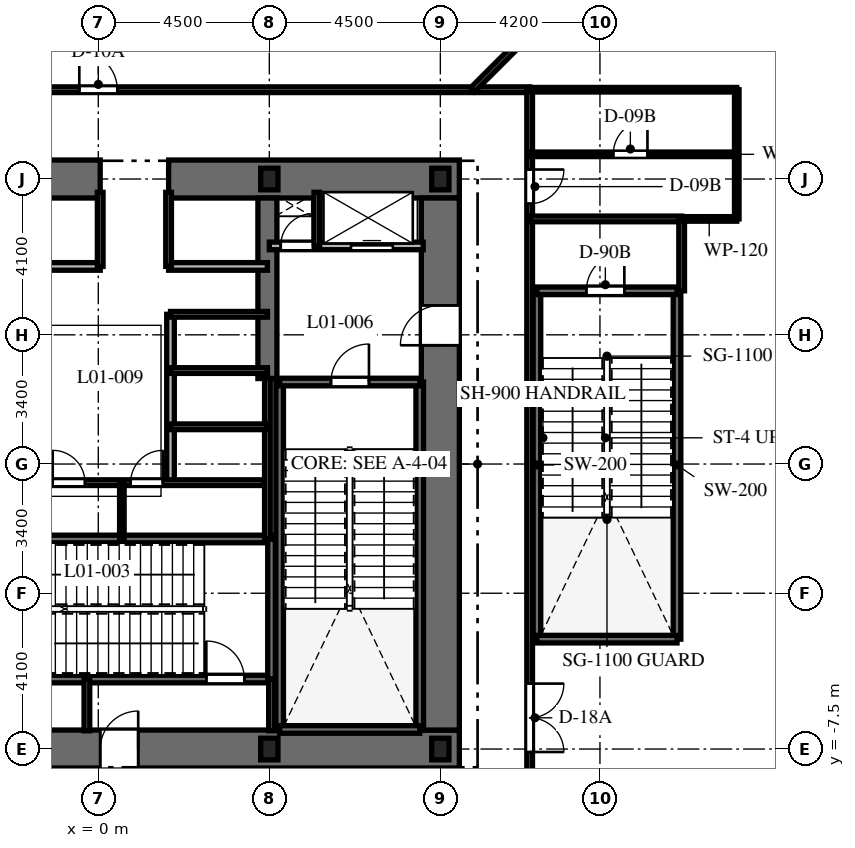
"""IFC4 building model, lengths in metres.
Left out: names, types, materials, properties, quantities, classifications, styles, units other than length and angle.
Written with IfcOpenShell. Run it as: python <this file> out.ifc"""

import sys

from ifc_helpers import new_model, si_unit, direction, frame, frame_2d, origin, origin_2d, place, context, subcontext, project, spatial, rectangle, i_section, extrude, element, fill, save


model = new_model("IFC4")
c1 = context("Model", 3, precision=1e-05, world=origin(), true_north=direction((0.0, 1.0)))
c2 = subcontext(c1, "Body", "Model", "MODEL_VIEW")
j1 = project(units=[si_unit("LENGTHUNIT", "METRE"), si_unit("PLANEANGLEUNIT", "RADIAN")], contexts=[c1])
p1 = place(None, origin())
s1 = spatial("IfcSite", under=j1, at=p1, CompositionType="ELEMENT")
p2 = place(p1, origin())
s2 = spatial("IfcBuilding", under=s1, at=p2, CompositionType="ELEMENT")
p3 = place(p2, frame((0.0, 0.0, 6.0)))
s3 = spatial("IfcBuildingStorey", under=s2, at=p3, CompositionType="ELEMENT", Elevation=6.0)
p4 = place(p3, frame((-9.5, -7.5, 0.0), z_axis=(0.0, 0.0, 1.0), x_axis=(1.0, 0.0, 0.0)))
e1 = element("IfcWall", 1, at=p4, inside=s3, PredefinedType="SHEAR", context=c2, shape_type="SweptSolid", body=[
    extrude(rectangle(XDim=19.0, YDim=1.0, at=frame_2d((9.5, 0.0))), origin(), (0.0, 0.0, 1.0), 5.4),
])
p5 = place(p4, frame((9.55, 0.0, 0.0)))
e2 = element("IfcOpeningElement", 2, at=p5, cuts=e1, PredefinedType="OPENING", context=c2, shape_type="SweptSolid", body=[
    extrude(rectangle(XDim=1.0, YDim=2.15, at=frame_2d((0.5, 1.075))), frame((0.0, 0.51, 0.0), z_axis=(0.0, -1.0, 0.0), x_axis=(1.0, 0.0, 0.0)), (0.0, 0.0, 1.0), 1.02),
])
p6 = place(p3, frame((-9.5, 7.5, 0.0), z_axis=(0.0, 0.0, 1.0), x_axis=(1.0, 0.0, 0.0)))
e3 = element("IfcWall", 3, at=p6, inside=s3, PredefinedType="SHEAR", context=c2, shape_type="SweptSolid", body=[
    extrude(rectangle(XDim=9.55, YDim=1.0, at=frame_2d((4.775, 0.0))), origin(), (0.0, 0.0, 1.0), 5.4),
])
p7 = place(p3, frame((1.85, 7.5, 0.0), z_axis=(0.0, 0.0, 1.0), x_axis=(1.0, 0.0, 0.0)))
e4 = element("IfcWall", 4, at=p7, inside=s3, PredefinedType="SHEAR", context=c2, shape_type="SweptSolid", body=[
    extrude(rectangle(XDim=7.65, YDim=1.0, at=frame_2d((3.825, 0.0))), origin(), (0.0, 0.0, 1.0), 5.4),
])
p8 = place(p3, frame((9.0, -7.0, 0.0), z_axis=(0.0, 0.0, 1.0), x_axis=(0.0, 1.0, 0.0)))
e5 = element("IfcWall", 5, at=p8, inside=s3, PredefinedType="SHEAR", context=c2, shape_type="SweptSolid", body=[
    extrude(rectangle(XDim=14.0, YDim=1.0, at=frame_2d((7.0, 0.0))), origin(), (0.0, 0.0, 1.0), 5.4),
])
p9 = place(p8, frame((10.125, 0.0, 0.0)))
e6 = element("IfcOpeningElement", 6, at=p9, cuts=e5, PredefinedType="OPENING", context=c2, shape_type="SweptSolid", body=[
    extrude(rectangle(XDim=1.05, YDim=2.15, at=frame_2d((0.525, 1.075))), frame((0.0, 0.51, 0.0), z_axis=(0.0, -1.0, 0.0), x_axis=(1.0, 0.0, 0.0)), (0.0, 0.0, 1.0), 1.02),
])
p10 = place(p3, frame((4.45, 2.25, 0.0), z_axis=(0.0, 0.0, 1.0), x_axis=(0.0, 1.0, 0.0)))
e7 = element("IfcWall", 7, at=p10, inside=s3, PredefinedType="SHEAR", context=c2, shape_type="SweptSolid", body=[
    extrude(rectangle(XDim=4.75, YDim=0.5, at=frame_2d((2.375, 0.0))), origin(), (0.0, 0.0, 1.0), 5.4),
])
for number, where, z_axis, x_axis in (
    (8, (4.772, -6.985, 0.0), (0.0, 0.0, 1.0), (0.0, 1.0, 0.0)),
    (9, (8.458, -6.985, 0.0), (0.0, 0.0, 1.0), (0.0, 1.0, 0.0)),
):
    element("IfcWall", number, at=place(p3, frame(where, z_axis=z_axis, x_axis=x_axis)), inside=s3, PredefinedType="SHEAR", context=c2, shape_type="SweptSolid", body=[
        extrude(rectangle(XDim=9.143, YDim=0.2, at=frame_2d((4.572, 0.0))), origin(), (0.0, 0.0, 1.0), 5.4),
    ])
p11 = place(p3, frame((4.772, -6.985, 0.0), z_axis=(0.0, 0.0, 1.0), x_axis=(1.0, 0.0, 0.0)))
e10 = element("IfcWall", 10, at=p11, inside=s3, PredefinedType="SHEAR", context=c2, shape_type="SweptSolid", body=[
    extrude(rectangle(XDim=3.686, YDim=0.2, at=frame_2d((1.843, 0.0))), origin(), (0.0, 0.0, 1.0), 5.4),
])
p12 = place(p3, frame((4.772, 2.158, 0.0), z_axis=(0.0, 0.0, 1.0), x_axis=(1.0, 0.0, 0.0)))
e11 = element("IfcWall", 11, at=p12, inside=s3, PredefinedType="SHEAR", context=c2, shape_type="SweptSolid", body=[
    extrude(rectangle(XDim=3.686, YDim=0.2, at=frame_2d((1.843, 0.0))), origin(), (0.0, 0.0, 1.0), 5.4),
])
p13 = place(p12, frame((1.35, 0.0, 0.0)))
e12 = element("IfcOpeningElement", 12, at=p13, cuts=e11, PredefinedType="OPENING", context=c2, shape_type="SweptSolid", body=[
    extrude(rectangle(XDim=1.0, YDim=2.15, at=frame_2d((0.5, 1.075))), frame((0.0, 0.11, 0.0), z_axis=(0.0, -1.0, 0.0), x_axis=(1.0, 0.0, 0.0)), (0.0, 0.0, 1.0), 0.22),
])
p14 = place(p3, frame((-4.608, -5.658, 0.0), z_axis=(0.0, 0.0, 1.0), x_axis=(1.0, 0.0, 0.0)))
e13 = element("IfcWall", 13, at=p14, inside=s3, PredefinedType="SHEAR", context=c2, shape_type="SweptSolid", body=[
    extrude(rectangle(XDim=9.166, YDim=0.2, at=frame_2d((4.583, 0.0))), origin(), (0.0, 0.0, 1.0), 5.4),
])
p15 = place(p14, frame((7.45, 0.0, 0.0)))
e14 = element("IfcOpeningElement", 14, at=p15, cuts=e13, PredefinedType="OPENING", context=c2, shape_type="SweptSolid", body=[
    extrude(rectangle(XDim=1.0, YDim=2.15, at=frame_2d((0.5, 1.075))), frame((0.0, 0.11, 0.0), z_axis=(0.0, -1.0, 0.0), x_axis=(1.0, 0.0, 0.0)), (0.0, 0.0, 1.0), 0.22),
])
p16 = place(p3, frame((-4.608, -1.972, 0.0), z_axis=(0.0, 0.0, 1.0), x_axis=(1.0, 0.0, 0.0)))
e15 = element("IfcWall", 15, at=p16, inside=s3, PredefinedType="SHEAR", context=c2, shape_type="SweptSolid", body=[
    extrude(rectangle(XDim=9.166, YDim=0.2, at=frame_2d((4.583, 0.0))), origin(), (0.0, 0.0, 1.0), 5.4),
])
p17 = place(p3, frame((4.558, -5.658, 0.0), z_axis=(0.0, 0.0, 1.0), x_axis=(0.0, 1.0, 0.0)))
e16 = element("IfcWall", 16, at=p17, inside=s3, PredefinedType="SHEAR", context=c2, shape_type="SweptSolid", body=[
    extrude(rectangle(XDim=3.686, YDim=0.2, at=frame_2d((1.843, 0.0))), origin(), (0.0, 0.0, 1.0), 5.4),
])
for number, where, z_axis, x_axis in (
    (17, (11.542, -4.608, 0.0), (0.0, 0.0, 1.0), (0.0, 1.0, 0.0)),
    (18, (15.228, -4.608, 0.0), (0.0, 0.0, 1.0), (0.0, 1.0, 0.0)),
):
    element("IfcWall", number, at=place(p3, frame(where, z_axis=z_axis, x_axis=x_axis)), inside=s3, PredefinedType="SHEAR", context=c2, shape_type="SweptSolid", body=[
        extrude(rectangle(XDim=9.166, YDim=0.2, at=frame_2d((4.583, 0.0))), origin(), (0.0, 0.0, 1.0), 5.4),
    ])
p18 = place(p3, frame((11.542, -4.608, 0.0), z_axis=(0.0, 0.0, 1.0), x_axis=(1.0, 0.0, 0.0)))
e19 = element("IfcWall", 19, at=p18, inside=s3, PredefinedType="SHEAR", context=c2, shape_type="SweptSolid", body=[
    extrude(rectangle(XDim=3.686, YDim=0.2, at=frame_2d((1.843, 0.0))), origin(), (0.0, 0.0, 1.0), 5.4),
])
p19 = place(p3, frame((11.542, 4.558, 0.0), z_axis=(0.0, 0.0, 1.0), x_axis=(1.0, 0.0, 0.0)))
e20 = element("IfcWall", 20, at=p19, inside=s3, PredefinedType="SHEAR", context=c2, shape_type="SweptSolid", body=[
    extrude(rectangle(XDim=3.686, YDim=0.2, at=frame_2d((1.843, 0.0))), origin(), (0.0, 0.0, 1.0), 5.4),
])
p20 = place(p19, frame((1.3, 0.0, 0.0)))
e21 = element("IfcOpeningElement", 21, at=p20, cuts=e20, PredefinedType="OPENING", context=c2, shape_type="SweptSolid", body=[
    extrude(rectangle(XDim=1.0, YDim=2.15, at=frame_2d((0.5, 1.075))), frame((0.0, 0.11, 0.0), z_axis=(0.0, -1.0, 0.0), x_axis=(1.0, 0.0, 0.0)), (0.0, 0.0, 1.0), 0.22),
])
for number, where, z_axis, x_axis in (
    (22, (4.5, -7.5, 0.0), (0.0, 0.0, 1.0), (1.0, 0.0, 0.0)),
    (23, (9.0, -7.5, 0.0), (0.0, 0.0, 1.0), (1.0, 0.0, 0.0)),
    (24, (9.0, 7.5, 0.0), (0.0, 0.0, 1.0), (1.0, 0.0, 0.0)),
    (25, (4.5, 7.5, 0.0), (0.0, 0.0, 1.0), (1.0, 0.0, 0.0)),
):
    element("IfcColumn", number, at=place(p3, frame(where, z_axis=z_axis, x_axis=x_axis)), inside=s3, PredefinedType="COLUMN", context=c2, shape_type="SweptSolid", body=[
        extrude(i_section(OverallWidth=0.454, OverallDepth=0.569, WebThickness=0.078, FlangeThickness=0.125, at=origin_2d()), origin(), (0.0, 0.0, 1.0), 5.4),
    ])
for number, where, z_axis, x_axis in (
    (26, (-0.3, -7.02, 0.0), (0.0, 0.0, 1.0), (0.0, 1.0, 0.0)),
    (27, (4.558, -7.02, 0.0), (0.0, 0.0, 1.0), (0.0, 1.0, 0.0)),
):
    element("IfcWall", number, at=place(p3, frame(where, z_axis=z_axis, x_axis=x_axis)), inside=s3, PredefinedType="PARTITIONING", context=c2, shape_type="SweptSolid", body=[
        extrude(rectangle(XDim=1.362, YDim=0.15, at=frame_2d((0.681, 0.0))), origin(), (0.0, 0.0, 1.0), 5.08),
    ])
p21 = place(p3, frame((4.5, 5.74, 0.0), z_axis=(0.0, 0.0, 1.0), x_axis=(1.0, 0.0, 0.0)))
e28 = element("IfcWall", 28, at=p21, inside=s3, PredefinedType="PARTITIONING", context=c2, shape_type="SweptSolid", body=[
    extrude(rectangle(XDim=4.05, YDim=0.2, at=frame_2d((2.025, 0.0))), origin(), (0.0, 0.0, 1.0), 5.08),
])
p22 = place(p21, frame((0.3, 0.0, 0.0)))
e29 = element("IfcOpeningElement", 29, at=p22, cuts=e28, PredefinedType="OPENING", context=c2, shape_type="SweptSolid", body=[
    extrude(rectangle(XDim=0.85, YDim=2.03, at=frame_2d((0.425, 1.015))), frame((0.0, 0.11, 0.0), z_axis=(0.0, -1.0, 0.0), x_axis=(1.0, 0.0, 0.0)), (0.0, 0.0, 1.0), 0.22),
])
p23 = place(p21, frame((2.15, 0.0, 0.0)))
e30 = element("IfcOpeningElement", 30, at=p23, cuts=e28, PredefinedType="OPENING", context=c2, shape_type="SweptSolid", body=[
    extrude(rectangle(XDim=1.1, YDim=2.2, at=frame_2d((0.55, 1.1))), frame((0.0, 0.11, 0.0), z_axis=(0.0, -1.0, 0.0), x_axis=(1.0, 0.0, 0.0)), (0.0, 0.0, 1.0), 0.22),
])
p24 = place(p3, frame((5.75, 5.74, 0.0), z_axis=(0.0, 0.0, 1.0), x_axis=(0.0, 1.0, 0.0)))
e31 = element("IfcWall", 31, at=p24, inside=s3, PredefinedType="PARTITIONING", context=c2, shape_type="SweptSolid", body=[
    extrude(rectangle(XDim=1.41, YDim=0.15, at=frame_2d((0.705, 0.0))), origin(), (0.0, 0.0, 1.0), 5.08),
])
p25 = place(p3, frame((-4.45, 5.2, 0.0), z_axis=(0.0, 0.0, 1.0), x_axis=(1.0, 0.0, 0.0)))
e32 = element("IfcWall", 32, at=p25, inside=s3, PredefinedType="PARTITIONING", context=c2, shape_type="SweptSolid", body=[
    extrude(rectangle(XDim=4.5, YDim=0.2, at=frame_2d((2.25, 0.0))), origin(), (0.0, 0.0, 1.0), 5.08),
])
p26 = place(p3, frame((1.85, 5.2, 0.0), z_axis=(0.0, 0.0, 1.0), x_axis=(1.0, 0.0, 0.0)))
e33 = element("IfcWall", 33, at=p26, inside=s3, PredefinedType="PARTITIONING", context=c2, shape_type="SweptSolid", body=[
    extrude(rectangle(XDim=2.6, YDim=0.2, at=frame_2d((1.3, 0.0))), origin(), (0.0, 0.0, 1.0), 5.08),
])
for number, where, z_axis, x_axis in (
    (34, (0.05, 5.2, 0.0), (0.0, 0.0, 1.0), (0.0, 1.0, 0.0)),
    (35, (1.85, 5.2, 0.0), (0.0, 0.0, 1.0), (0.0, 1.0, 0.0)),
):
    element("IfcWall", number, at=place(p3, frame(where, z_axis=z_axis, x_axis=x_axis)), inside=s3, PredefinedType="PARTITIONING", context=c2, shape_type="SweptSolid", body=[
        extrude(rectangle(XDim=1.95, YDim=0.15, at=frame_2d((0.975, 0.0))), origin(), (0.0, 0.0, 1.0), 5.08),
    ])
p27 = place(p3, frame((4.45, -1.972, 0.0), z_axis=(0.0, 0.0, 1.0), x_axis=(0.0, 1.0, 0.0)))
e36 = element("IfcWall", 36, at=p27, inside=s3, PredefinedType="PARTITIONING", context=c2, shape_type="SweptSolid", body=[
    extrude(rectangle(XDim=4.222, YDim=0.15, at=frame_2d((2.111, 0.0))), origin(), (0.0, 0.0, 1.0), 5.08),
])
p28 = place(p3, frame((1.9, -0.5, 0.0), z_axis=(0.0, 0.0, 1.0), x_axis=(0.0, 1.0, 0.0)))
e37 = element("IfcWall", 37, at=p28, inside=s3, PredefinedType="PARTITIONING", context=c2, shape_type="SweptSolid", body=[
    extrude(rectangle(XDim=4.44, YDim=0.2, at=frame_2d((2.22, 0.0))), origin(), (0.0, 0.0, 1.0), 5.08),
])
for number, where, z_axis, x_axis in (
    (38, (1.9, 3.94, 0.0), (0.0, 0.0, 1.0), (1.0, 0.0, 0.0)),
    (39, (1.9, 0.98, 0.0), (0.0, 0.0, 1.0), (1.0, 0.0, 0.0)),
    (40, (1.9, 2.46, 0.0), (0.0, 0.0, 1.0), (1.0, 0.0, 0.0)),
):
    element("IfcWall", number, at=place(p3, frame(where, z_axis=z_axis, x_axis=x_axis)), inside=s3, PredefinedType="PARTITIONING", context=c2, shape_type="SweptSolid", body=[
        extrude(rectangle(XDim=2.55, YDim=0.15, at=frame_2d((1.275, 0.0))), origin(), (0.0, 0.0, 1.0), 5.08),
    ])
p29 = place(p3, frame((-4.36, -0.49, 0.0), z_axis=(0.0, 0.0, 1.0), x_axis=(1.0, 0.0, 0.0)))
e41 = element("IfcWall", 41, at=p29, inside=s3, PredefinedType="PARTITIONING", context=c2, shape_type="SweptSolid", body=[
    extrude(rectangle(XDim=8.72, YDim=0.15, at=frame_2d((4.36, 0.0))), origin(), (0.0, 0.0, 1.0), 5.08),
])
p30 = place(p29, frame((3.16, 0.0, 0.0)))
e42 = element("IfcOpeningElement", 42, at=p30, cuts=e41, PredefinedType="OPENING", context=c2, shape_type="SweptSolid", body=[
    extrude(rectangle(XDim=0.85, YDim=2.03, at=frame_2d((0.425, 1.015))), frame((0.0, 0.085, 0.0), z_axis=(0.0, -1.0, 0.0), x_axis=(1.0, 0.0, 0.0)), (0.0, 0.0, 1.0), 0.17),
])
p31 = place(p29, frame((5.21, 0.0, 0.0)))
e43 = element("IfcOpeningElement", 43, at=p31, cuts=e41, PredefinedType="OPENING", context=c2, shape_type="SweptSolid", body=[
    extrude(rectangle(XDim=0.85, YDim=2.03, at=frame_2d((0.425, 1.015))), frame((0.0, 0.085, 0.0), z_axis=(0.0, -1.0, 0.0), x_axis=(1.0, 0.0, 0.0)), (0.0, 0.0, 1.0), 0.17),
])
p32 = place(p3, frame((0.62, -1.972, 0.0), z_axis=(0.0, 0.0, 1.0), x_axis=(0.0, 1.0, 0.0)))
e44 = element("IfcWall", 44, at=p32, inside=s3, PredefinedType="PARTITIONING", context=c2, shape_type="SweptSolid", body=[
    extrude(rectangle(XDim=1.472, YDim=0.12, at=frame_2d((0.736, 0.0))), origin(), (0.0, 0.0, 1.0), 5.08),
])
p33 = place(p3, frame((-11.35, 9.85, 0.0), z_axis=(0.0, 0.0, 1.0), x_axis=(1.0, 0.0, 0.0)))
e45 = element("IfcWall", 45, at=p33, inside=s3, PredefinedType="PARTITIONING", context=c2, shape_type="SweptSolid", body=[
    extrude(rectangle(XDim=22.7, YDim=0.15, at=frame_2d((11.35, 0.0))), origin(), (0.0, 0.0, 1.0), 4.122),
])
p34 = place(p33, frame((10.85, 0.0, 0.0)))
e46 = element("IfcOpeningElement", 46, at=p34, cuts=e45, PredefinedType="OPENING", context=c2, shape_type="SweptSolid", body=[
    extrude(rectangle(XDim=1.0, YDim=2.03, at=frame_2d((0.5, 1.015))), frame((0.0, 0.085, 0.0), z_axis=(0.0, -1.0, 0.0), x_axis=(1.0, 0.0, 0.0)), (0.0, 0.0, 1.0), 0.17),
])
p35 = place(p3, frame((11.35, 9.85, 0.0), z_axis=(0.0, 0.0, 1.0), x_axis=(0.0, -1.0, 0.0)))
e47 = element("IfcWall", 47, at=p35, inside=s3, PredefinedType="PARTITIONING", context=c2, shape_type="SweptSolid", body=[
    extrude(rectangle(XDim=19.7, YDim=0.15, at=frame_2d((9.85, 0.0))), origin(), (0.0, 0.0, 1.0), 4.122),
])
p36 = place(p35, frame((2.1, 0.0, 0.0)))
e48 = element("IfcOpeningElement", 48, at=p36, cuts=e47, PredefinedType="OPENING", context=c2, shape_type="SweptSolid", body=[
    extrude(rectangle(XDim=0.9, YDim=2.03, at=frame_2d((0.45, 1.015))), frame((0.0, 0.085, 0.0), z_axis=(0.0, -1.0, 0.0), x_axis=(1.0, 0.0, 0.0)), (0.0, 0.0, 1.0), 0.17),
])
p37 = place(p35, frame((15.628, 0.0, 0.0)))
e49 = element("IfcOpeningElement", 49, at=p37, cuts=e47, PredefinedType="OPENING", context=c2, shape_type="SweptSolid", body=[
    extrude(rectangle(XDim=1.8, YDim=2.2, at=frame_2d((0.9, 1.1))), frame((0.0, 0.085, 0.0), z_axis=(0.0, -1.0, 0.0), x_axis=(1.0, 0.0, 0.0)), (0.0, 0.0, 1.0), 0.17),
])
p38 = place(p3, frame((11.35, 6.45, 0.0), z_axis=(0.0, 0.0, 1.0), x_axis=(1.0, 0.0, 0.0)))
e50 = element("IfcWall", 50, at=p38, inside=s3, PredefinedType="PARTITIONING", context=c2, shape_type="SweptSolid", body=[
    extrude(rectangle(XDim=4.0, YDim=0.15, at=frame_2d((2.0, 0.0))), origin(), (0.0, 0.0, 1.0), 5.08),
])
p39 = place(p3, frame((15.35, 4.558, 0.0), z_axis=(0.0, 0.0, 1.0), x_axis=(0.0, 1.0, 0.0)))
e51 = element("IfcWall", 51, at=p39, inside=s3, PredefinedType="PARTITIONING", context=c2, shape_type="SweptSolid", body=[
    extrude(rectangle(XDim=1.892, YDim=0.15, at=frame_2d((0.946, 0.0))), origin(), (0.0, 0.0, 1.0), 5.08),
])
p40 = place(p3, frame((15.35, 6.45, 0.0), z_axis=(0.0, 0.0, 1.0), x_axis=(1.0, 0.0, 0.0)))
e52 = element("IfcWall", 52, at=p40, inside=s3, PredefinedType="PARTITIONING", context=c2, shape_type="SweptSolid", body=[
    extrude(rectangle(XDim=1.45, YDim=0.12, at=frame_2d((0.725, 0.0))), origin(), (0.0, 0.0, 1.0), 5.08),
])
p41 = place(p3, frame((16.8, 6.45, 0.0), z_axis=(0.0, 0.0, 1.0), x_axis=(0.0, 1.0, 0.0)))
e53 = element("IfcWall", 53, at=p41, inside=s3, PredefinedType="PARTITIONING", context=c2, shape_type="SweptSolid", body=[
    extrude(rectangle(XDim=3.4, YDim=0.12, at=frame_2d((1.7, 0.0))), origin(), (0.0, 0.0, 1.0), 5.08),
])
p42 = place(p3, frame((11.35, 9.85, 0.0), z_axis=(0.0, 0.0, 1.0), x_axis=(1.0, 0.0, 0.0)))
e54 = element("IfcWall", 54, at=p42, inside=s3, PredefinedType="PARTITIONING", context=c2, shape_type="SweptSolid", body=[
    extrude(rectangle(XDim=5.45, YDim=0.12, at=frame_2d((2.725, 0.0))), origin(), (0.0, 0.0, 1.0), 4.214),
])
p43 = place(p3, frame((11.35, 8.15, 0.0), z_axis=(0.0, 0.0, 1.0), x_axis=(1.0, 0.0, 0.0)))
e55 = element("IfcWall", 55, at=p43, inside=s3, PredefinedType="PARTITIONING", context=c2, shape_type="SweptSolid", body=[
    extrude(rectangle(XDim=5.45, YDim=0.12, at=frame_2d((2.725, 0.0))), origin(), (0.0, 0.0, 1.0), 5.08),
])
p44 = place(p43, frame((2.2, 0.0, 0.0)))
e56 = element("IfcOpeningElement", 56, at=p44, cuts=e55, PredefinedType="OPENING", context=c2, shape_type="SweptSolid", body=[
    extrude(rectangle(XDim=0.9, YDim=2.03, at=frame_2d((0.45, 1.015))), frame((0.0, 0.07, 0.0), z_axis=(0.0, -1.0, 0.0), x_axis=(1.0, 0.0, 0.0)), (0.0, 0.0, 1.0), 0.14),
])
p45 = place(p3, frame((9.85, 9.85, 0.0), z_axis=(0.0, 0.0, 1.0), x_axis=(0.707106781187, 0.707106781187, 0.0)))
e57 = element("IfcWall", 57, at=p45, inside=s3, PredefinedType="PARTITIONING", context=c2, shape_type="SweptSolid", body=[
    extrude(rectangle(XDim=18.801, YDim=0.15, at=frame_2d((9.401, 0.0))), origin(), (0.0, 0.0, 1.0), 4.122),
])
p46 = place(p13, origin())
e58 = element("IfcDoor", 58, at=p46, inside=s3, OperationType="SINGLE_SWING_RIGHT", PredefinedType="DOOR", context=c2, shape_type="SweptSolid", body=[
    extrude(rectangle(XDim=1.0, YDim=2.15, at=frame_2d((0.5, 1.075))), frame((0.0, 0.025, 0.0), z_axis=(0.0, -1.0, 0.0), x_axis=(1.0, 0.0, 0.0)), (0.0, 0.0, 1.0), 0.05),
])
fill(e12, e58)
p47 = place(p15, origin())
e59 = element("IfcDoor", 59, at=p47, inside=s3, OperationType="SINGLE_SWING_LEFT", PredefinedType="DOOR", context=c2, shape_type="SweptSolid", body=[
    extrude(rectangle(XDim=1.0, YDim=2.15, at=frame_2d((0.5, 1.075))), frame((0.0, 0.025, 0.0), z_axis=(0.0, -1.0, 0.0), x_axis=(1.0, 0.0, 0.0)), (0.0, 0.0, 1.0), 0.05),
])
fill(e14, e59)
p48 = place(p5, origin())
e60 = element("IfcDoor", 60, at=p48, inside=s3, OperationType="SINGLE_SWING_RIGHT", PredefinedType="DOOR", context=c2, shape_type="SweptSolid", body=[
    extrude(rectangle(XDim=1.0, YDim=2.15, at=frame_2d((0.5, 1.075))), frame((0.0, 0.025, 0.0), z_axis=(0.0, -1.0, 0.0), x_axis=(1.0, 0.0, 0.0)), (0.0, 0.0, 1.0), 0.05),
])
fill(e2, e60)
p49 = place(p9, origin())
e61 = element("IfcDoor", 61, at=p49, inside=s3, OperationType="SINGLE_SWING_LEFT", PredefinedType="DOOR", context=c2, shape_type="SweptSolid", body=[
    extrude(rectangle(XDim=1.05, YDim=2.15, at=frame_2d((0.525, 1.075))), frame((0.0, 0.025, 0.0), z_axis=(0.0, -1.0, 0.0), x_axis=(1.0, 0.0, 0.0)), (0.0, 0.0, 1.0), 0.05),
])
fill(e6, e61)
p50 = place(p22, origin())
e62 = element("IfcDoor", 62, at=p50, inside=s3, OperationType="SINGLE_SWING_RIGHT", PredefinedType="DOOR", context=c2, shape_type="SweptSolid", body=[
    extrude(rectangle(XDim=0.85, YDim=2.03, at=frame_2d((0.425, 1.015))), frame((0.0, 0.025, 0.0), z_axis=(0.0, -1.0, 0.0), x_axis=(1.0, 0.0, 0.0)), (0.0, 0.0, 1.0), 0.05),
])
fill(e29, e62)
p51 = place(p23, origin())
e63 = element("IfcDoor", 63, at=p51, inside=s3, OperationType="SLIDING_TO_RIGHT", PredefinedType="DOOR", context=c2, shape_type="SweptSolid", body=[
    extrude(rectangle(XDim=1.1, YDim=2.2, at=frame_2d((0.55, 1.1))), frame((0.0, 0.025, 0.0), z_axis=(0.0, -1.0, 0.0), x_axis=(1.0, 0.0, 0.0)), (0.0, 0.0, 1.0), 0.05),
])
fill(e30, e63)
p52 = place(p30, origin())
e64 = element("IfcDoor", 64, at=p52, inside=s3, OperationType="SINGLE_SWING_LEFT", PredefinedType="DOOR", context=c2, shape_type="SweptSolid", body=[
    extrude(rectangle(XDim=0.85, YDim=2.03, at=frame_2d((0.425, 1.015))), frame((0.0, 0.025, 0.0), z_axis=(0.0, -1.0, 0.0), x_axis=(1.0, 0.0, 0.0)), (0.0, 0.0, 1.0), 0.05),
])
fill(e42, e64)
p53 = place(p31, origin())
e65 = element("IfcDoor", 65, at=p53, inside=s3, OperationType="SINGLE_SWING_RIGHT", PredefinedType="DOOR", context=c2, shape_type="SweptSolid", body=[
    extrude(rectangle(XDim=0.85, YDim=2.03, at=frame_2d((0.425, 1.015))), frame((0.0, 0.025, 0.0), z_axis=(0.0, -1.0, 0.0), x_axis=(1.0, 0.0, 0.0)), (0.0, 0.0, 1.0), 0.05),
])
fill(e43, e65)
p54 = place(p20, origin())
e66 = element("IfcDoor", 66, at=p54, inside=s3, OperationType="SINGLE_SWING_RIGHT", PredefinedType="DOOR", context=c2, shape_type="SweptSolid", body=[
    extrude(rectangle(XDim=1.0, YDim=2.15, at=frame_2d((0.5, 1.075))), frame((0.0, 0.025, 0.0), z_axis=(0.0, -1.0, 0.0), x_axis=(1.0, 0.0, 0.0)), (0.0, 0.0, 1.0), 0.05),
])
fill(e21, e66)
p55 = place(p36, origin())
e67 = element("IfcDoor", 67, at=p55, inside=s3, OperationType="SINGLE_SWING_LEFT", PredefinedType="DOOR", context=c2, shape_type="SweptSolid", body=[
    extrude(rectangle(XDim=0.9, YDim=2.03, at=frame_2d((0.45, 1.015))), frame((0.0, 0.025, 0.0), z_axis=(0.0, -1.0, 0.0), x_axis=(1.0, 0.0, 0.0)), (0.0, 0.0, 1.0), 0.05),
])
fill(e48, e67)
p56 = place(p44, origin())
e68 = element("IfcDoor", 68, at=p56, inside=s3, OperationType="SINGLE_SWING_RIGHT", PredefinedType="DOOR", context=c2, shape_type="SweptSolid", body=[
    extrude(rectangle(XDim=0.9, YDim=2.03, at=frame_2d((0.45, 1.015))), frame((0.0, 0.025, 0.0), z_axis=(0.0, -1.0, 0.0), x_axis=(1.0, 0.0, 0.0)), (0.0, 0.0, 1.0), 0.05),
])
fill(e56, e68)
p57 = place(p37, origin())
e69 = element("IfcDoor", 69, at=p57, inside=s3, OperationType="DOUBLE_SWING_LEFT", PredefinedType="DOOR", context=c2, shape_type="SweptSolid", body=[
    extrude(rectangle(XDim=1.8, YDim=2.2, at=frame_2d((0.9, 1.1))), frame((0.0, 0.025, 0.0), z_axis=(0.0, -1.0, 0.0), x_axis=(1.0, 0.0, 0.0)), (0.0, 0.0, 1.0), 0.05),
])
fill(e49, e69)
p58 = place(p34, origin())
e70 = element("IfcDoor", 70, at=p58, inside=s3, OperationType="SINGLE_SWING_LEFT", PredefinedType="DOOR", context=c2, shape_type="SweptSolid", body=[
    extrude(rectangle(XDim=1.0, YDim=2.03, at=frame_2d((0.5, 1.015))), frame((0.0, 0.025, 0.0), z_axis=(0.0, -1.0, 0.0), x_axis=(1.0, 0.0, 0.0)), (0.0, 0.0, 1.0), 0.05),
])
fill(e46, e70)
save(model, sys.argv[1])
